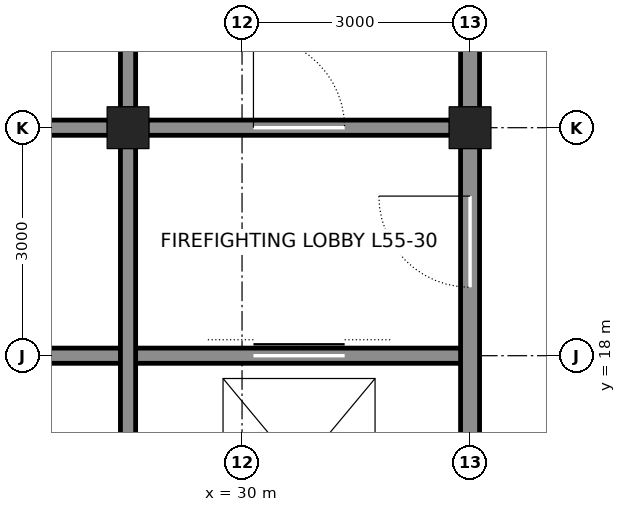
"""IFC4 building model, lengths in metres.
Left out: names, types, materials, properties, quantities, classifications, styles, units other than length and angle.
Written with IfcOpenShell. Run it as: python <this file> out.ifc"""

import sys

from ifc_helpers import new_model, si_unit, direction, frame, frame_2d, origin, origin_2d, place, context, subcontext, project, spatial, rectangle, hollow_rectangle, extrude, element, fill, save


model = new_model("IFC4")
c1 = context("Model", 3, precision=1e-05, world=origin(), true_north=direction((0.0, 1.0)))
c2 = subcontext(c1, "Body", "Model", "MODEL_VIEW")
j1 = project(units=[si_unit("LENGTHUNIT", "METRE"), si_unit("PLANEANGLEUNIT", "RADIAN")], contexts=[c1])
p1 = place(None, origin())
s1 = spatial("IfcSite", under=j1, at=p1, CompositionType="ELEMENT")
p2 = place(p1, origin())
s2 = spatial("IfcBuilding", under=s1, at=p2, CompositionType="ELEMENT")
p3 = place(p2, frame((0.0, 0.0, 247.5)))
s3 = spatial("IfcBuildingStorey", under=s2, at=p3, CompositionType="ELEMENT", Elevation=247.5)
for number, where, z_axis, x_axis in (
    (1, (33.0, 21.0, 0.0), (0.0, 0.0, 1.0), (1.0, 0.0, 0.0)),
    (2, (28.5, 21.0, 0.0), (0.0, 0.0, 1.0), (1.0, 0.0, 0.0)),
):
    element("IfcColumn", number, at=place(p3, frame(where, z_axis=z_axis, x_axis=x_axis)), inside=s3, PredefinedType="COLUMN", context=c2, shape_type="SweptSolid", body=[
        extrude(hollow_rectangle(XDim=0.55, YDim=0.55, WallThickness=0.045, at=origin_2d()), origin(), (0.0, 0.0, 1.0), 4.2),
    ])
p4 = place(p3, frame((25.5, 18.0, 0.0), z_axis=(0.0, 0.0, 1.0), x_axis=(1.0, 0.0, 0.0)))
e3 = element("IfcWall", 3, at=p4, inside=s3, PredefinedType="SOLIDWALL", context=c2, shape_type="SweptSolid", body=[
    extrude(rectangle(XDim=7.5, YDim=0.2, at=frame_2d((3.75, 0.0))), origin(), (0.0, 0.0, 1.0), 4.04),
])
p5 = place(p4, frame((4.65, 0.0, 0.0)))
e4 = element("IfcOpeningElement", 4, at=p5, cuts=e3, PredefinedType="OPENING", context=c2, shape_type="SweptSolid", body=[
    extrude(rectangle(XDim=1.2, YDim=2.1, at=frame_2d((0.6, 1.05))), frame((0.0, 0.11, 0.0), z_axis=(0.0, -1.0, 0.0), x_axis=(1.0, 0.0, 0.0)), (0.0, 0.0, 1.0), 0.22),
])
p6 = place(p3, frame((25.5, 21.0, 0.0), z_axis=(0.0, 0.0, 1.0), x_axis=(1.0, 0.0, 0.0)))
e5 = element("IfcWall", 5, at=p6, inside=s3, PredefinedType="SOLIDWALL", context=c2, shape_type="SweptSolid", body=[
    extrude(rectangle(XDim=2.75, YDim=0.2, at=frame_2d((1.375, 0.0))), origin(), (0.0, 0.0, 1.0), 3.09),
])
p7 = place(p3, frame((28.75, 21.0, 0.0), z_axis=(0.0, 0.0, 1.0), x_axis=(1.0, 0.0, 0.0)))
e6 = element("IfcWall", 6, at=p7, inside=s3, PredefinedType="SOLIDWALL", context=c2, shape_type="SweptSolid", body=[
    extrude(rectangle(XDim=4.0, YDim=0.2, at=frame_2d((2.0, 0.0))), origin(), (0.0, 0.0, 1.0), 3.09),
])
p8 = place(p7, frame((1.4, 0.0, 0.0)))
e7 = element("IfcOpeningElement", 7, at=p8, cuts=e6, PredefinedType="OPENING", context=c2, shape_type="SweptSolid", body=[
    extrude(rectangle(XDim=1.2, YDim=2.1, at=frame_2d((0.6, 1.05))), frame((0.0, 0.11, 0.0), z_axis=(0.0, -1.0, 0.0), x_axis=(1.0, 0.0, 0.0)), (0.0, 0.0, 1.0), 0.22),
])
p9 = place(p3, frame((28.5, 12.25, 0.0), z_axis=(0.0, 0.0, 1.0), x_axis=(0.0, 1.0, 0.0)))
e8 = element("IfcWall", 8, at=p9, inside=s3, PredefinedType="SOLIDWALL", context=c2, shape_type="SweptSolid", body=[
    extrude(rectangle(XDim=8.5, YDim=0.2, at=frame_2d((4.25, 0.0))), origin(), (0.0, 0.0, 1.0), 3.113),
])
p10 = place(p3, frame((28.5, 21.25, 0.0), z_axis=(0.0, 0.0, 1.0), x_axis=(0.0, 1.0, 0.0)))
e9 = element("IfcWall", 9, at=p10, inside=s3, PredefinedType="SOLIDWALL", context=c2, shape_type="SweptSolid", body=[
    extrude(rectangle(XDim=2.5, YDim=0.2, at=frame_2d((1.25, 0.0))), origin(), (0.0, 0.0, 1.0), 3.113),
])
p11 = place(p3, frame((33.0, 12.25, 0.0), z_axis=(0.0, 0.0, 1.0), x_axis=(0.0, 1.0, 0.0)))
e10 = element("IfcWall", 10, at=p11, inside=s3, PredefinedType="SOLIDWALL", context=c2, shape_type="SweptSolid", body=[
    extrude(rectangle(XDim=8.5, YDim=0.25, at=frame_2d((4.25, 0.0))), origin(), (0.0, 0.0, 1.0), 3.113),
])
p12 = place(p11, frame((6.65, 0.0, 0.0)))
e11 = element("IfcOpeningElement", 11, at=p12, cuts=e10, PredefinedType="OPENING", context=c2, shape_type="SweptSolid", body=[
    extrude(rectangle(XDim=1.2, YDim=2.1, at=frame_2d((0.6, 1.05))), frame((0.0, 0.135, 0.0), z_axis=(0.0, -1.0, 0.0), x_axis=(1.0, 0.0, 0.0)), (0.0, 0.0, 1.0), 0.27),
])
p13 = place(p11, frame((0.875, 0.0, 0.0)))
e12 = element("IfcOpeningElement", 12, at=p13, cuts=e10, PredefinedType="OPENING", context=c2, shape_type="SweptSolid", body=[
    extrude(rectangle(XDim=0.75, YDim=2.1, at=frame_2d((0.375, 1.05))), frame((0.0, 0.135, 0.0), z_axis=(0.0, -1.0, 0.0), x_axis=(1.0, 0.0, 0.0)), (0.0, 0.0, 1.0), 0.27),
])
p14 = place(p3, frame((33.0, 21.25, 0.0), z_axis=(0.0, 0.0, 1.0), x_axis=(0.0, 1.0, 0.0)))
e13 = element("IfcWall", 13, at=p14, inside=s3, PredefinedType="SOLIDWALL", context=c2, shape_type="SweptSolid", body=[
    extrude(rectangle(XDim=2.5, YDim=0.25, at=frame_2d((1.25, 0.0))), origin(), (0.0, 0.0, 1.0), 3.113),
])
p15 = place(p8, origin())
e14 = element("IfcDoor", 14, at=p15, inside=s3, OperationType="SINGLE_SWING_LEFT", PredefinedType="DOOR", context=c2, shape_type="SweptSolid", body=[
    extrude(rectangle(XDim=1.2, YDim=2.1, at=frame_2d((0.6, 1.05))), frame((0.0, 0.025, 0.0), z_axis=(0.0, -1.0, 0.0), x_axis=(1.0, 0.0, 0.0)), (0.0, 0.0, 1.0), 0.05),
])
fill(e7, e14)
p16 = place(p12, origin())
e15 = element("IfcDoor", 15, at=p16, inside=s3, OperationType="SINGLE_SWING_RIGHT", PredefinedType="DOOR", context=c2, shape_type="SweptSolid", body=[
    extrude(rectangle(XDim=1.2, YDim=2.1, at=frame_2d((0.6, 1.05))), frame((0.0, 0.025, 0.0), z_axis=(0.0, -1.0, 0.0), x_axis=(1.0, 0.0, 0.0)), (0.0, 0.0, 1.0), 0.05),
])
fill(e11, e15)
p17 = place(p5, origin())
e16 = element("IfcDoor", 16, at=p17, inside=s3, OperationType="DOUBLE_DOOR_SLIDING", PredefinedType="DOOR", context=c2, shape_type="SweptSolid", body=[
    extrude(rectangle(XDim=1.2, YDim=2.1, at=frame_2d((0.6, 1.05))), frame((0.0, 0.025, 0.0), z_axis=(0.0, -1.0, 0.0), x_axis=(1.0, 0.0, 0.0)), (0.0, 0.0, 1.0), 0.05),
])
fill(e4, e16)
save(model, sys.argv[1])
